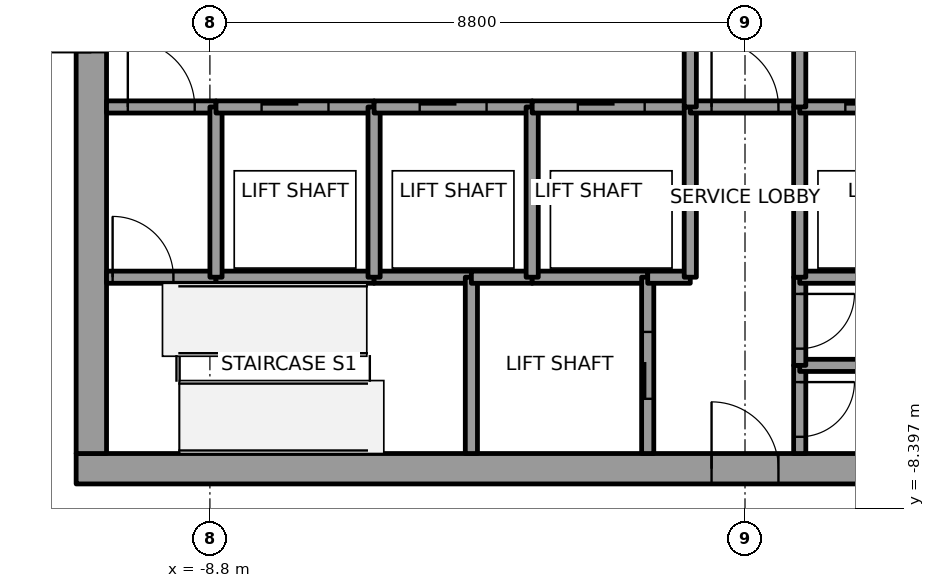
"""IFC4 building model, lengths in metres.
Left out: names, types, materials, properties, quantities, classifications, styles, units other than length and angle.
Written with IfcOpenShell. Run it as: python <this file> out.ifc"""

import sys

from ifc_helpers import new_model, si_unit, direction, frame, frame_2d, origin, place, context, subcontext, project, spatial, rectangle, extrude, element, fill, save


model = new_model("IFC4")
c1 = context("Model", 3, precision=1e-05, world=origin(), true_north=direction((0.0, 1.0)))
c2 = subcontext(c1, "Body", "Model", "MODEL_VIEW")
j1 = project(units=[si_unit("LENGTHUNIT", "METRE"), si_unit("PLANEANGLEUNIT", "RADIAN")], contexts=[c1])
p1 = place(None, origin())
s1 = spatial("IfcSite", under=j1, at=p1, CompositionType="ELEMENT")
p2 = place(p1, origin())
s2 = spatial("IfcBuilding", under=s1, at=p2, CompositionType="ELEMENT")
p3 = place(p2, frame((0.0, 0.0, 255.0)))
s3 = spatial("IfcBuildingStorey", under=s2, at=p3, CompositionType="ELEMENT", Elevation=255.0)
p4 = place(p3, frame((-11.0, -7.75, 0.0), z_axis=(0.0, 0.0, 1.0), x_axis=(1.0, 0.0, 0.0)))
e1 = element("IfcWall", 1, at=p4, inside=s3, PredefinedType="SHEAR", context=c2, shape_type="SweptSolid", body=[
    extrude(rectangle(XDim=22.0, YDim=0.5, at=frame_2d((11.0, 0.0))), origin(), (0.0, 0.0, 1.0), 4.0),
])
p5 = place(p4, frame((10.45, 0.0, 0.0)))
e2 = element("IfcOpeningElement", 2, at=p5, cuts=e1, PredefinedType="OPENING", context=c2, shape_type="SweptSolid", body=[
    extrude(rectangle(XDim=1.1, YDim=2.1, at=frame_2d((0.55, 1.05))), frame((0.0, 0.25, 0.0), z_axis=(0.0, -1.0, 0.0), x_axis=(1.0, 0.0, 0.0)), (0.0, 0.0, 1.0), 0.5),
])
p6 = place(p3, frame((-10.75, -7.5, 0.0), z_axis=(0.0, 0.0, 1.0), x_axis=(0.0, 1.0, 0.0)))
e3 = element("IfcWall", 3, at=p6, inside=s3, PredefinedType="SHEAR", context=c2, shape_type="SweptSolid", body=[
    extrude(rectangle(XDim=15.0, YDim=0.5, at=frame_2d((7.5, 0.0))), origin(), (0.0, 0.0, 1.0), 4.0),
])
p7 = place(p6, frame((6.6, 0.0, 0.0)))
e4 = element("IfcOpeningElement", 4, at=p7, cuts=e3, PredefinedType="OPENING", context=c2, shape_type="SweptSolid", body=[
    extrude(rectangle(XDim=1.8, YDim=2.1, at=frame_2d((0.9, 1.05))), frame((0.0, 0.25, 0.0), z_axis=(0.0, -1.0, 0.0), x_axis=(1.0, 0.0, 0.0)), (0.0, 0.0, 1.0), 0.5),
])
p8 = place(p3, frame((-10.5, -4.6, 0.0), z_axis=(0.0, 0.0, 1.0), x_axis=(1.0, 0.0, 0.0)))
e5 = element("IfcWall", 5, at=p8, inside=s3, PredefinedType="SOLIDWALL", context=c2, shape_type="SweptSolid", body=[
    extrude(rectangle(XDim=1.8, YDim=0.2, at=frame_2d((0.9, 0.0))), origin(), (0.0, 0.0, 1.0), 3.85),
])
p9 = place(p8, frame((0.1, 0.0, 0.0)))
e6 = element("IfcOpeningElement", 6, at=p9, cuts=e5, PredefinedType="OPENING", context=c2, shape_type="SweptSolid", body=[
    extrude(rectangle(XDim=1.0, YDim=2.1, at=frame_2d((0.5, 1.05))), frame((0.0, 0.1, 0.0), z_axis=(0.0, -1.0, 0.0), x_axis=(1.0, 0.0, 0.0)), (0.0, 0.0, 1.0), 0.2),
])
p10 = place(p3, frame((-10.5, -1.8, 0.0), z_axis=(0.0, 0.0, 1.0), x_axis=(1.0, 0.0, 0.0)))
e7 = element("IfcWall", 7, at=p10, inside=s3, PredefinedType="SOLIDWALL", context=c2, shape_type="SweptSolid", body=[
    extrude(rectangle(XDim=1.8, YDim=0.2, at=frame_2d((0.9, 0.0))), origin(), (0.0, 0.0, 1.0), 3.85),
])
p11 = place(p10, frame((0.35, 0.0, 0.0)))
e8 = element("IfcOpeningElement", 8, at=p11, cuts=e7, PredefinedType="OPENING", context=c2, shape_type="SweptSolid", body=[
    extrude(rectangle(XDim=1.1, YDim=2.1, at=frame_2d((0.55, 1.05))), frame((0.0, 0.1, 0.0), z_axis=(0.0, -1.0, 0.0), x_axis=(1.0, 0.0, 0.0)), (0.0, 0.0, 1.0), 0.2),
])
p12 = place(p3, frame((-8.7, -4.6, 0.0), z_axis=(0.0, 0.0, 1.0), x_axis=(1.0, 0.0, 0.0)))
e9 = element("IfcWall", 9, at=p12, inside=s3, PredefinedType="SOLIDWALL", context=c2, shape_type="SweptSolid", body=[
    extrude(rectangle(XDim=2.6, YDim=0.2, at=frame_2d((1.3, 0.0))), origin(), (0.0, 0.0, 1.0), 3.85),
])
p13 = place(p3, frame((-8.7, -4.6, 0.0), z_axis=(0.0, 0.0, 1.0), x_axis=(0.0, 1.0, 0.0)))
e10 = element("IfcWall", 10, at=p13, inside=s3, PredefinedType="SOLIDWALL", context=c2, shape_type="SweptSolid", body=[
    extrude(rectangle(XDim=2.8, YDim=0.2, at=frame_2d((1.4, 0.0))), origin(), (0.0, 0.0, 1.0), 3.85),
])
p14 = place(p3, frame((-8.7, -1.8, 0.0), z_axis=(0.0, 0.0, 1.0), x_axis=(1.0, 0.0, 0.0)))
e11 = element("IfcWall", 11, at=p14, inside=s3, PredefinedType="SOLIDWALL", context=c2, shape_type="SweptSolid", body=[
    extrude(rectangle(XDim=2.6, YDim=0.2, at=frame_2d((1.3, 0.0))), origin(), (0.0, 0.0, 1.0), 3.85),
])
p15 = place(p14, frame((0.75, 0.0, 0.0)))
e12 = element("IfcOpeningElement", 12, at=p15, cuts=e11, PredefinedType="OPENING", context=c2, shape_type="SweptSolid", body=[
    extrude(rectangle(XDim=1.1, YDim=2.1, at=frame_2d((0.55, 1.05))), frame((0.0, 0.1, 0.0), z_axis=(0.0, -1.0, 0.0), x_axis=(1.0, 0.0, 0.0)), (0.0, 0.0, 1.0), 0.2),
])
p16 = place(p3, frame((-6.1, -4.6, 0.0), z_axis=(0.0, 0.0, 1.0), x_axis=(1.0, 0.0, 0.0)))
e13 = element("IfcWall", 13, at=p16, inside=s3, PredefinedType="SOLIDWALL", context=c2, shape_type="SweptSolid", body=[
    extrude(rectangle(XDim=1.6, YDim=0.2, at=frame_2d((0.8, 0.0))), origin(), (0.0, 0.0, 1.0), 3.85),
])
p17 = place(p3, frame((-6.1, -4.6, 0.0), z_axis=(0.0, 0.0, 1.0), x_axis=(0.0, 1.0, 0.0)))
e14 = element("IfcWall", 14, at=p17, inside=s3, PredefinedType="SOLIDWALL", context=c2, shape_type="SweptSolid", body=[
    extrude(rectangle(XDim=2.8, YDim=0.2, at=frame_2d((1.4, 0.0))), origin(), (0.0, 0.0, 1.0), 3.85),
])
p18 = place(p3, frame((-6.1, -1.8, 0.0), z_axis=(0.0, 0.0, 1.0), x_axis=(1.0, 0.0, 0.0)))
e15 = element("IfcWall", 15, at=p18, inside=s3, PredefinedType="SOLIDWALL", context=c2, shape_type="SweptSolid", body=[
    extrude(rectangle(XDim=2.6, YDim=0.2, at=frame_2d((1.3, 0.0))), origin(), (0.0, 0.0, 1.0), 3.85),
])
p19 = place(p18, frame((0.75, 0.0, 0.0)))
e16 = element("IfcOpeningElement", 16, at=p19, cuts=e15, PredefinedType="OPENING", context=c2, shape_type="SweptSolid", body=[
    extrude(rectangle(XDim=1.1, YDim=2.1, at=frame_2d((0.55, 1.05))), frame((0.0, 0.1, 0.0), z_axis=(0.0, -1.0, 0.0), x_axis=(1.0, 0.0, 0.0)), (0.0, 0.0, 1.0), 0.2),
])
p20 = place(p3, frame((-4.5, -4.6, 0.0), z_axis=(0.0, 0.0, 1.0), x_axis=(0.0, -1.0, 0.0)))
e17 = element("IfcWall", 17, at=p20, inside=s3, PredefinedType="SOLIDWALL", context=c2, shape_type="SweptSolid", body=[
    extrude(rectangle(XDim=2.9, YDim=0.2, at=frame_2d((1.45, 0.0))), origin(), (0.0, 0.0, 1.0), 3.85),
])
p21 = place(p3, frame((-4.5, -4.6, 0.0), z_axis=(0.0, 0.0, 1.0), x_axis=(1.0, 0.0, 0.0)))
e18 = element("IfcWall", 18, at=p21, inside=s3, PredefinedType="SOLIDWALL", context=c2, shape_type="SweptSolid", body=[
    extrude(rectangle(XDim=1.0, YDim=0.2, at=frame_2d((0.5, 0.0))), origin(), (0.0, 0.0, 1.0), 3.85),
])
p22 = place(p3, frame((-3.5, -4.6, 0.0), z_axis=(0.0, 0.0, 1.0), x_axis=(1.0, 0.0, 0.0)))
e19 = element("IfcWall", 19, at=p22, inside=s3, PredefinedType="SOLIDWALL", context=c2, shape_type="SweptSolid", body=[
    extrude(rectangle(XDim=1.9, YDim=0.2, at=frame_2d((0.95, 0.0))), origin(), (0.0, 0.0, 1.0), 3.85),
])
p23 = place(p3, frame((-3.5, -4.6, 0.0), z_axis=(0.0, 0.0, 1.0), x_axis=(0.0, 1.0, 0.0)))
e20 = element("IfcWall", 20, at=p23, inside=s3, PredefinedType="SOLIDWALL", context=c2, shape_type="SweptSolid", body=[
    extrude(rectangle(XDim=2.8, YDim=0.2, at=frame_2d((1.4, 0.0))), origin(), (0.0, 0.0, 1.0), 3.85),
])
p24 = place(p3, frame((-3.5, -1.8, 0.0), z_axis=(0.0, 0.0, 1.0), x_axis=(1.0, 0.0, 0.0)))
e21 = element("IfcWall", 21, at=p24, inside=s3, PredefinedType="SOLIDWALL", context=c2, shape_type="SweptSolid", body=[
    extrude(rectangle(XDim=2.6, YDim=0.2, at=frame_2d((1.3, 0.0))), origin(), (0.0, 0.0, 1.0), 3.85),
])
p25 = place(p24, frame((0.75, 0.0, 0.0)))
e22 = element("IfcOpeningElement", 22, at=p25, cuts=e21, PredefinedType="OPENING", context=c2, shape_type="SweptSolid", body=[
    extrude(rectangle(XDim=1.1, YDim=2.1, at=frame_2d((0.55, 1.05))), frame((0.0, 0.1, 0.0), z_axis=(0.0, -1.0, 0.0), x_axis=(1.0, 0.0, 0.0)), (0.0, 0.0, 1.0), 0.2),
])
p26 = place(p3, frame((-1.6, -7.5, 0.0), z_axis=(0.0, 0.0, 1.0), x_axis=(0.0, 1.0, 0.0)))
e23 = element("IfcWall", 23, at=p26, inside=s3, PredefinedType="SOLIDWALL", context=c2, shape_type="SweptSolid", body=[
    extrude(rectangle(XDim=2.9, YDim=0.2, at=frame_2d((1.45, 0.0))), origin(), (0.0, 0.0, 1.0), 3.85),
])
p27 = place(p26, frame((0.9, 0.0, 0.0)))
e24 = element("IfcOpeningElement", 24, at=p27, cuts=e23, PredefinedType="OPENING", context=c2, shape_type="SweptSolid", body=[
    extrude(rectangle(XDim=1.1, YDim=2.1, at=frame_2d((0.55, 1.05))), frame((0.0, 0.1, 0.0), z_axis=(0.0, -1.0, 0.0), x_axis=(1.0, 0.0, 0.0)), (0.0, 0.0, 1.0), 0.2),
])
p28 = place(p3, frame((-1.6, -4.6, 0.0), z_axis=(0.0, 0.0, 1.0), x_axis=(1.0, 0.0, 0.0)))
e25 = element("IfcWall", 25, at=p28, inside=s3, PredefinedType="SOLIDWALL", context=c2, shape_type="SweptSolid", body=[
    extrude(rectangle(XDim=0.7, YDim=0.2, at=frame_2d((0.35, 0.0))), origin(), (0.0, 0.0, 1.0), 3.85),
])
p29 = place(p3, frame((-0.9, -4.6, 0.0), z_axis=(0.0, 0.0, 1.0), x_axis=(0.0, 1.0, 0.0)))
e26 = element("IfcWall", 26, at=p29, inside=s3, PredefinedType="SOLIDWALL", context=c2, shape_type="SweptSolid", body=[
    extrude(rectangle(XDim=2.8, YDim=0.2, at=frame_2d((1.4, 0.0))), origin(), (0.0, 0.0, 1.0), 3.85),
])
p30 = place(p3, frame((-0.9, -1.8, 0.0), z_axis=(0.0, 0.0, 1.0), x_axis=(1.0, 0.0, 0.0)))
e27 = element("IfcWall", 27, at=p30, inside=s3, PredefinedType="SOLIDWALL", context=c2, shape_type="SweptSolid", body=[
    extrude(rectangle(XDim=1.8, YDim=0.2, at=frame_2d((0.9, 0.0))), origin(), (0.0, 0.0, 1.0), 3.85),
])
p31 = place(p30, frame((0.35, 0.0, 0.0)))
e28 = element("IfcOpeningElement", 28, at=p31, cuts=e27, PredefinedType="OPENING", context=c2, shape_type="SweptSolid", body=[
    extrude(rectangle(XDim=1.1, YDim=2.1, at=frame_2d((0.55, 1.05))), frame((0.0, 0.1, 0.0), z_axis=(0.0, -1.0, 0.0), x_axis=(1.0, 0.0, 0.0)), (0.0, 0.0, 1.0), 0.2),
])
p32 = place(p3, frame((-0.9, 1.8, 0.0), z_axis=(0.0, 0.0, 1.0), x_axis=(0.0, -1.0, 0.0)))
e29 = element("IfcWall", 29, at=p32, inside=s3, PredefinedType="SOLIDWALL", context=c2, shape_type="SweptSolid", body=[
    extrude(rectangle(XDim=3.6, YDim=0.2, at=frame_2d((1.8, 0.0))), origin(), (0.0, 0.0, 1.0), 3.85),
])
p33 = place(p32, frame((1.05, 0.0, 0.0)))
e30 = element("IfcOpeningElement", 30, at=p33, cuts=e29, PredefinedType="OPENING", context=c2, shape_type="SweptSolid", body=[
    extrude(rectangle(XDim=1.5, YDim=2.1, at=frame_2d((0.75, 1.05))), frame((0.0, 0.1, 0.0), z_axis=(0.0, -1.0, 0.0), x_axis=(1.0, 0.0, 0.0)), (0.0, 0.0, 1.0), 0.2),
])
p34 = place(p3, frame((0.9, -6.05, 0.0), z_axis=(0.0, 0.0, 1.0), x_axis=(0.0, -1.0, 0.0)))
e31 = element("IfcWall", 31, at=p34, inside=s3, PredefinedType="SOLIDWALL", context=c2, shape_type="SweptSolid", body=[
    extrude(rectangle(XDim=1.45, YDim=0.2, at=frame_2d((0.725, 0.0))), origin(), (0.0, 0.0, 1.0), 3.85),
])
p35 = place(p34, frame((0.275, 0.0, 0.0)))
e32 = element("IfcOpeningElement", 32, at=p35, cuts=e31, PredefinedType="OPENING", context=c2, shape_type="SweptSolid", body=[
    extrude(rectangle(XDim=0.9, YDim=2.1, at=frame_2d((0.45, 1.05))), frame((0.0, 0.1, 0.0), z_axis=(0.0, -1.0, 0.0), x_axis=(1.0, 0.0, 0.0)), (0.0, 0.0, 1.0), 0.2),
])
p36 = place(p3, frame((4.5, -6.05, 0.0), z_axis=(0.0, 0.0, 1.0), x_axis=(-1.0, 0.0, 0.0)))
e33 = element("IfcWall", 33, at=p36, inside=s3, PredefinedType="SOLIDWALL", context=c2, shape_type="SweptSolid", body=[
    extrude(rectangle(XDim=3.6, YDim=0.2, at=frame_2d((1.8, 0.0))), origin(), (0.0, 0.0, 1.0), 3.85),
])
p37 = place(p3, frame((0.9, -4.6, 0.0), z_axis=(0.0, 0.0, 1.0), x_axis=(0.0, -1.0, 0.0)))
e34 = element("IfcWall", 34, at=p37, inside=s3, PredefinedType="SOLIDWALL", context=c2, shape_type="SweptSolid", body=[
    extrude(rectangle(XDim=1.45, YDim=0.2, at=frame_2d((0.725, 0.0))), origin(), (0.0, 0.0, 1.0), 3.85),
])
p38 = place(p37, frame((0.275, 0.0, 0.0)))
e35 = element("IfcOpeningElement", 35, at=p38, cuts=e34, PredefinedType="OPENING", context=c2, shape_type="SweptSolid", body=[
    extrude(rectangle(XDim=0.9, YDim=2.1, at=frame_2d((0.45, 1.05))), frame((0.0, 0.1, 0.0), z_axis=(0.0, -1.0, 0.0), x_axis=(1.0, 0.0, 0.0)), (0.0, 0.0, 1.0), 0.2),
])
p39 = place(p3, frame((3.5, -4.6, 0.0), z_axis=(0.0, 0.0, 1.0), x_axis=(-1.0, 0.0, 0.0)))
e36 = element("IfcWall", 36, at=p39, inside=s3, PredefinedType="SOLIDWALL", context=c2, shape_type="SweptSolid", body=[
    extrude(rectangle(XDim=2.6, YDim=0.2, at=frame_2d((1.3, 0.0))), origin(), (0.0, 0.0, 1.0), 3.85),
])
p40 = place(p3, frame((0.9, -1.8, 0.0), z_axis=(0.0, 0.0, 1.0), x_axis=(0.0, -1.0, 0.0)))
e37 = element("IfcWall", 37, at=p40, inside=s3, PredefinedType="SOLIDWALL", context=c2, shape_type="SweptSolid", body=[
    extrude(rectangle(XDim=2.8, YDim=0.2, at=frame_2d((1.4, 0.0))), origin(), (0.0, 0.0, 1.0), 3.85),
])
p41 = place(p3, frame((0.9, -1.8, 0.0), z_axis=(0.0, 0.0, 1.0), x_axis=(1.0, 0.0, 0.0)))
e38 = element("IfcWall", 38, at=p41, inside=s3, PredefinedType="SOLIDWALL", context=c2, shape_type="SweptSolid", body=[
    extrude(rectangle(XDim=2.6, YDim=0.2, at=frame_2d((1.3, 0.0))), origin(), (0.0, 0.0, 1.0), 3.85),
])
p42 = place(p41, frame((0.75, 0.0, 0.0)))
e39 = element("IfcOpeningElement", 39, at=p42, cuts=e38, PredefinedType="OPENING", context=c2, shape_type="SweptSolid", body=[
    extrude(rectangle(XDim=1.1, YDim=2.1, at=frame_2d((0.55, 1.05))), frame((0.0, 0.1, 0.0), z_axis=(0.0, -1.0, 0.0), x_axis=(1.0, 0.0, 0.0)), (0.0, 0.0, 1.0), 0.2),
])
p43 = place(p3, frame((0.9, -1.8, 0.0), z_axis=(0.0, 0.0, 1.0), x_axis=(0.0, 1.0, 0.0)))
e40 = element("IfcWall", 40, at=p43, inside=s3, PredefinedType="SOLIDWALL", context=c2, shape_type="SweptSolid", body=[
    extrude(rectangle(XDim=3.6, YDim=0.2, at=frame_2d((1.8, 0.0))), origin(), (0.0, 0.0, 1.0), 3.85),
])
p44 = place(p43, frame((1.05, 0.0, 0.0)))
e41 = element("IfcOpeningElement", 41, at=p44, cuts=e40, PredefinedType="OPENING", context=c2, shape_type="SweptSolid", body=[
    extrude(rectangle(XDim=1.5, YDim=2.1, at=frame_2d((0.75, 1.05))), frame((0.0, 0.1, 0.0), z_axis=(0.0, -1.0, 0.0), x_axis=(1.0, 0.0, 0.0)), (0.0, 0.0, 1.0), 0.2),
])
p45 = place(p15, origin())
e42 = element("IfcDoor", 42, at=p45, inside=s3, OperationType="SLIDING_TO_RIGHT", PredefinedType="DOOR", context=c2, shape_type="SweptSolid", body=[
    extrude(rectangle(XDim=1.1, YDim=2.1, at=frame_2d((0.55, 1.05))), frame((0.0, 0.025, 0.0), z_axis=(0.0, -1.0, 0.0), x_axis=(1.0, 0.0, 0.0)), (0.0, 0.0, 1.0), 0.05),
])
fill(e12, e42)
p46 = place(p19, origin())
e43 = element("IfcDoor", 43, at=p46, inside=s3, OperationType="SLIDING_TO_LEFT", PredefinedType="DOOR", context=c2, shape_type="SweptSolid", body=[
    extrude(rectangle(XDim=1.1, YDim=2.1, at=frame_2d((0.55, 1.05))), frame((0.0, 0.025, 0.0), z_axis=(0.0, -1.0, 0.0), x_axis=(1.0, 0.0, 0.0)), (0.0, 0.0, 1.0), 0.05),
])
fill(e16, e43)
p47 = place(p25, origin())
e44 = element("IfcDoor", 44, at=p47, inside=s3, OperationType="SLIDING_TO_RIGHT", PredefinedType="DOOR", context=c2, shape_type="SweptSolid", body=[
    extrude(rectangle(XDim=1.1, YDim=2.1, at=frame_2d((0.55, 1.05))), frame((0.0, 0.025, 0.0), z_axis=(0.0, -1.0, 0.0), x_axis=(1.0, 0.0, 0.0)), (0.0, 0.0, 1.0), 0.05),
])
fill(e22, e44)
p48 = place(p42, origin())
e45 = element("IfcDoor", 45, at=p48, inside=s3, OperationType="SLIDING_TO_RIGHT", PredefinedType="DOOR", context=c2, shape_type="SweptSolid", body=[
    extrude(rectangle(XDim=1.1, YDim=2.1, at=frame_2d((0.55, 1.05))), frame((0.0, 0.025, 0.0), z_axis=(0.0, -1.0, 0.0), x_axis=(1.0, 0.0, 0.0)), (0.0, 0.0, 1.0), 0.05),
])
fill(e39, e45)
p49 = place(p27, origin())
e46 = element("IfcDoor", 46, at=p49, inside=s3, OperationType="SLIDING_TO_LEFT", PredefinedType="DOOR", context=c2, shape_type="SweptSolid", body=[
    extrude(rectangle(XDim=1.1, YDim=2.1, at=frame_2d((0.55, 1.05))), frame((0.0, 0.025, 0.0), z_axis=(0.0, -1.0, 0.0), x_axis=(1.0, 0.0, 0.0)), (0.0, 0.0, 1.0), 0.05),
])
fill(e24, e46)
p50 = place(p11, origin())
e47 = element("IfcDoor", 47, at=p50, inside=s3, OperationType="SINGLE_SWING_LEFT", PredefinedType="DOOR", context=c2, shape_type="SweptSolid", body=[
    extrude(rectangle(XDim=1.1, YDim=2.1, at=frame_2d((0.55, 1.05))), frame((0.0, 0.025, 0.0), z_axis=(0.0, -1.0, 0.0), x_axis=(1.0, 0.0, 0.0)), (0.0, 0.0, 1.0), 0.05),
])
fill(e8, e47)
p51 = place(p31, origin())
e48 = element("IfcDoor", 48, at=p51, inside=s3, OperationType="SINGLE_SWING_LEFT", PredefinedType="DOOR", context=c2, shape_type="SweptSolid", body=[
    extrude(rectangle(XDim=1.1, YDim=2.1, at=frame_2d((0.55, 1.05))), frame((0.0, 0.025, 0.0), z_axis=(0.0, -1.0, 0.0), x_axis=(1.0, 0.0, 0.0)), (0.0, 0.0, 1.0), 0.05),
])
fill(e28, e48)
p52 = place(p9, origin())
e49 = element("IfcDoor", 49, at=p52, inside=s3, OperationType="SINGLE_SWING_LEFT", PredefinedType="DOOR", context=c2, shape_type="SweptSolid", body=[
    extrude(rectangle(XDim=1.0, YDim=2.1, at=frame_2d((0.5, 1.05))), frame((0.0, 0.025, 0.0), z_axis=(0.0, -1.0, 0.0), x_axis=(1.0, 0.0, 0.0)), (0.0, 0.0, 1.0), 0.05),
])
fill(e6, e49)
p53 = place(p35, origin())
e50 = element("IfcDoor", 50, at=p53, inside=s3, OperationType="SINGLE_SWING_RIGHT", PredefinedType="DOOR", context=c2, shape_type="SweptSolid", body=[
    extrude(rectangle(XDim=0.9, YDim=2.1, at=frame_2d((0.45, 1.05))), frame((0.0, 0.025, 0.0), z_axis=(0.0, -1.0, 0.0), x_axis=(1.0, 0.0, 0.0)), (0.0, 0.0, 1.0), 0.05),
])
fill(e32, e50)
p54 = place(p38, origin())
e51 = element("IfcDoor", 51, at=p54, inside=s3, OperationType="SINGLE_SWING_RIGHT", PredefinedType="DOOR", context=c2, shape_type="SweptSolid", body=[
    extrude(rectangle(XDim=0.9, YDim=2.1, at=frame_2d((0.45, 1.05))), frame((0.0, 0.025, 0.0), z_axis=(0.0, -1.0, 0.0), x_axis=(1.0, 0.0, 0.0)), (0.0, 0.0, 1.0), 0.05),
])
fill(e35, e51)
p55 = place(p7, origin())
e52 = element("IfcDoor", 52, at=p55, inside=s3, OperationType="DOUBLE_DOOR_SINGLE_SWING", PredefinedType="DOOR", context=c2, shape_type="SweptSolid", body=[
    extrude(rectangle(XDim=1.8, YDim=2.1, at=frame_2d((0.9, 1.05))), frame((0.0, 0.025, 0.0), z_axis=(0.0, -1.0, 0.0), x_axis=(1.0, 0.0, 0.0)), (0.0, 0.0, 1.0), 0.05),
])
fill(e4, e52)
p56 = place(p5, origin())
e53 = element("IfcDoor", 53, at=p56, inside=s3, OperationType="SINGLE_SWING_RIGHT", PredefinedType="DOOR", context=c2, shape_type="SweptSolid", body=[
    extrude(rectangle(XDim=1.1, YDim=2.1, at=frame_2d((0.55, 1.05))), frame((0.0, 0.025, 0.0), z_axis=(0.0, -1.0, 0.0), x_axis=(1.0, 0.0, 0.0)), (0.0, 0.0, 1.0), 0.05),
])
fill(e2, e53)
save(model, sys.argv[1])
